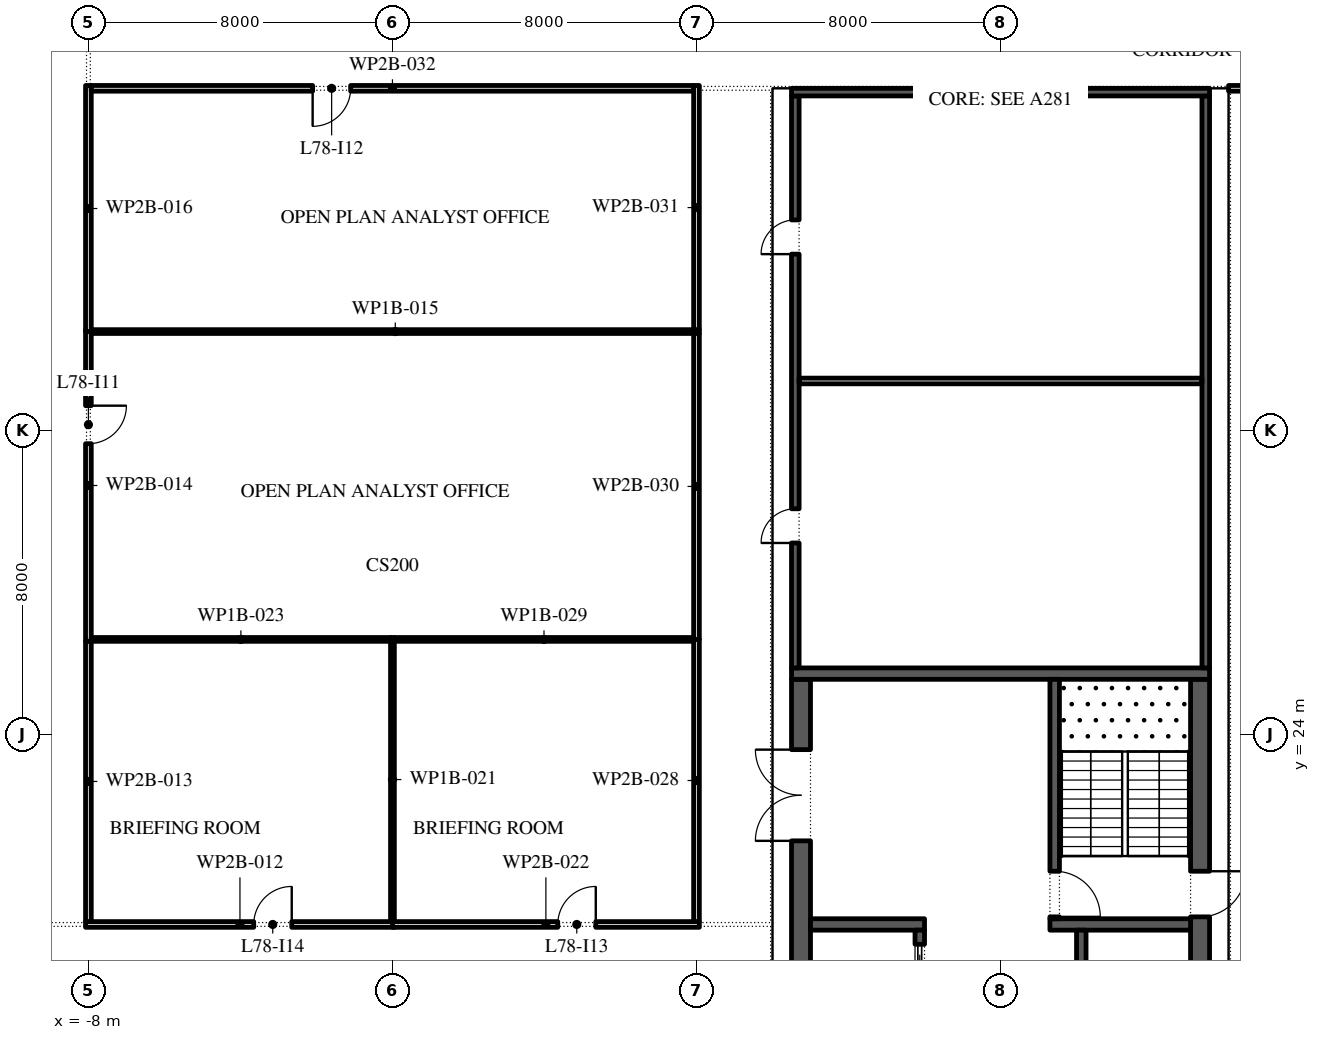
"""IFC4 building model, lengths in metres.
Left out: names, types, materials, properties, quantities, classifications, styles, units other than length and angle.
Written with IfcOpenShell. Run it as: python <this file> out.ifc"""

import sys

from ifc_helpers import new_model, si_unit, direction, frame, frame_2d, origin, place, context, subcontext, project, spatial, rectangle, extrude, element, fill, save


model = new_model("IFC4")
c1 = context("Model", 3, precision=1e-05, world=origin(), true_north=direction((0.0, 1.0)))
c2 = subcontext(c1, "Body", "Model", "MODEL_VIEW")
j1 = project(units=[si_unit("LENGTHUNIT", "METRE"), si_unit("PLANEANGLEUNIT", "RADIAN")], contexts=[c1])
p1 = place(None, origin())
s1 = spatial("IfcSite", under=j1, at=p1, CompositionType="ELEMENT")
p2 = place(p1, origin())
s2 = spatial("IfcBuilding", under=s1, at=p2, CompositionType="ELEMENT")
p3 = place(p2, frame((0.0, 0.0, 355.2)))
s3 = spatial("IfcBuildingStorey", under=s2, at=p3, CompositionType="ELEMENT", Elevation=355.2)
p4 = place(p3, frame((21.25, -2.45, 0.0), z_axis=(0.0, 0.0, 1.0), x_axis=(0.0, 1.0, 0.0)))
e1 = element("IfcWall", 1, at=p4, inside=s3, PredefinedType="SHEAR", context=c2, shape_type="SweptSolid", body=[
    extrude(rectangle(XDim=27.9, YDim=0.5, at=frame_2d((13.95, 0.0))), origin(), (0.0, 0.0, 1.0), 3.95),
])
p5 = place(p4, frame((5.05, 0.0, 0.0)))
e2 = element("IfcOpeningElement", 2, at=p5, cuts=e1, PredefinedType="OPENING", context=c2, shape_type="SweptSolid", body=[
    extrude(rectangle(XDim=1.2, YDim=2.1, at=frame_2d((0.6, 1.05))), frame((0.0, 0.26, 0.0), z_axis=(0.0, -1.0, 0.0), x_axis=(1.0, 0.0, 0.0)), (0.0, 0.0, 1.0), 0.52),
])
p6 = place(p4, frame((21.65, 0.0, 0.0)))
e3 = element("IfcOpeningElement", 3, at=p6, cuts=e1, PredefinedType="OPENING", context=c2, shape_type="SweptSolid", body=[
    extrude(rectangle(XDim=1.2, YDim=2.1, at=frame_2d((0.6, 1.05))), frame((0.0, 0.26, 0.0), z_axis=(0.0, -1.0, 0.0), x_axis=(1.0, 0.0, 0.0)), (0.0, 0.0, 1.0), 0.52),
])
p7 = place(p3, frame((10.75, -2.45, 0.0), z_axis=(0.0, 0.0, 1.0), x_axis=(0.0, 1.0, 0.0)))
e4 = element("IfcWall", 4, at=p7, inside=s3, PredefinedType="SHEAR", context=c2, shape_type="SweptSolid", body=[
    extrude(rectangle(XDim=27.9, YDim=0.5, at=frame_2d((13.95, 0.0))), origin(), (0.0, 0.0, 1.0), 3.95),
])
p8 = place(p7, frame((23.65, 0.0, 0.0)))
e5 = element("IfcOpeningElement", 5, at=p8, cuts=e4, PredefinedType="OPENING", context=c2, shape_type="SweptSolid", body=[
    extrude(rectangle(XDim=2.4, YDim=2.1, at=frame_2d((1.2, 1.05))), frame((0.0, 0.26, 0.0), z_axis=(0.0, -1.0, 0.0), x_axis=(1.0, 0.0, 0.0)), (0.0, 0.0, 1.0), 0.52),
])
p9 = place(p7, frame((1.087, 0.0, 0.0)))
e6 = element("IfcOpeningElement", 6, at=p9, cuts=e4, PredefinedType="OPENING", context=c2, shape_type="SweptSolid", body=[
    extrude(rectangle(XDim=0.9, YDim=2.1, at=frame_2d((0.45, 1.05))), frame((0.0, 0.26, 0.0), z_axis=(0.0, -1.0, 0.0), x_axis=(1.0, 0.0, 0.0)), (0.0, 0.0, 1.0), 0.52),
])
p10 = place(p7, frame((4.262, 0.0, 0.0)))
e7 = element("IfcOpeningElement", 7, at=p10, cuts=e4, PredefinedType="OPENING", context=c2, shape_type="SweptSolid", body=[
    extrude(rectangle(XDim=1.0, YDim=2.1, at=frame_2d((0.5, 1.05))), frame((0.0, 0.26, 0.0), z_axis=(0.0, -1.0, 0.0), x_axis=(1.0, 0.0, 0.0)), (0.0, 0.0, 1.0), 0.52),
])
p11 = place(p3, frame((10.5, 25.6, 0.0), z_axis=(0.0, 0.0, 1.0), x_axis=(1.0, 0.0, 0.0)))
e8 = element("IfcWall", 8, at=p11, inside=s3, PredefinedType="SHEAR", context=c2, shape_type="SweptSolid", body=[
    extrude(rectangle(XDim=11.0, YDim=0.3, at=frame_2d((5.5, 0.0))), origin(), (0.0, 0.0, 1.0), 3.95),
])
p12 = place(p3, frame((17.3, 19.0, 0.0), z_axis=(0.0, 0.0, 1.0), x_axis=(1.0, 0.0, 0.0)))
e9 = element("IfcWall", 9, at=p12, inside=s3, PredefinedType="SHEAR", context=c2, shape_type="SweptSolid", body=[
    extrude(rectangle(XDim=3.7, YDim=0.3, at=frame_2d((1.85, 0.0))), origin(), (0.0, 0.0, 1.0), 3.95),
])
p13 = place(p3, frame((17.425, 19.15, 0.0), z_axis=(0.0, 0.0, 1.0), x_axis=(0.0, 1.0, 0.0)))
e10 = element("IfcWall", 10, at=p13, inside=s3, PredefinedType="SHEAR", context=c2, shape_type="SweptSolid", body=[
    extrude(rectangle(XDim=6.3, YDim=0.25, at=frame_2d((3.15, 0.0))), origin(), (0.0, 0.0, 1.0), 3.95),
])
p14 = place(p13, frame((0.05, 0.0, 0.0)))
e11 = element("IfcOpeningElement", 11, at=p14, cuts=e10, PredefinedType="OPENING", context=c2, shape_type="SweptSolid", body=[
    extrude(rectangle(XDim=1.2, YDim=2.1, at=frame_2d((0.6, 1.05))), frame((0.0, 0.135, 0.0), z_axis=(0.0, -1.0, 0.0), x_axis=(1.0, 0.0, 0.0)), (0.0, 0.0, 1.0), 0.27),
])
p15 = place(p3, frame((18.125, 4.15, 0.0), z_axis=(0.0, 0.0, 1.0), x_axis=(0.0, 1.0, 0.0)))
e12 = element("IfcWall", 12, at=p15, inside=s3, PredefinedType="SHEAR", context=c2, shape_type="SweptSolid", body=[
    extrude(rectangle(XDim=14.7, YDim=0.25, at=frame_2d((7.35, 0.0))), origin(), (0.0, 0.0, 1.0), 3.95),
])
p16 = place(p15, frame((3.596, 0.0, 0.0)))
e13 = element("IfcOpeningElement", 13, at=p16, cuts=e12, PredefinedType="OPENING", context=c2, shape_type="SweptSolid", body=[
    extrude(rectangle(XDim=0.9, YDim=2.1, at=frame_2d((0.45, 1.05))), frame((0.0, 0.135, 0.0), z_axis=(0.0, -1.0, 0.0), x_axis=(1.0, 0.0, 0.0)), (0.0, 0.0, 1.0), 0.27),
])
p17 = place(p15, frame((9.875, 0.0, 0.0)))
e14 = element("IfcOpeningElement", 14, at=p17, cuts=e12, PredefinedType="OPENING", context=c2, shape_type="SweptSolid", body=[
    extrude(rectangle(XDim=0.9, YDim=2.1, at=frame_2d((0.45, 1.05))), frame((0.0, 0.135, 0.0), z_axis=(0.0, -1.0, 0.0), x_axis=(1.0, 0.0, 0.0)), (0.0, 0.0, 1.0), 0.27),
])
p18 = place(p15, frame((0.371, 0.0, 0.0)))
e15 = element("IfcOpeningElement", 15, at=p18, cuts=e12, PredefinedType="OPENING", context=c2, shape_type="SweptSolid", body=[
    extrude(rectangle(XDim=1.1, YDim=2.1, at=frame_2d((0.55, 1.05))), frame((0.0, 0.135, 0.0), z_axis=(0.0, -1.0, 0.0), x_axis=(1.0, 0.0, 0.0)), (0.0, 0.0, 1.0), 0.27),
])
p19 = place(p3, frame((11.0, 19.0, 0.0), z_axis=(0.0, 0.0, 1.0), x_axis=(1.0, 0.0, 0.0)))
e16 = element("IfcWall", 16, at=p19, inside=s3, PredefinedType="SHEAR", context=c2, shape_type="SweptSolid", body=[
    extrude(rectangle(XDim=3.0, YDim=0.3, at=frame_2d((1.5, 0.0))), origin(), (0.0, 0.0, 1.0), 3.95),
])
p20 = place(p3, frame((13.875, -2.45, 0.0), z_axis=(0.0, 0.0, 1.0), x_axis=(0.0, 1.0, 0.0)))
e17 = element("IfcWall", 17, at=p20, inside=s3, PredefinedType="SHEAR", context=c2, shape_type="SweptSolid", body=[
    extrude(rectangle(XDim=21.3, YDim=0.25, at=frame_2d((10.65, 0.0))), origin(), (0.0, 0.0, 1.0), 3.95),
])
p21 = place(p20, frame((11.357, 0.0, 0.0)))
e18 = element("IfcOpeningElement", 18, at=p21, cuts=e17, PredefinedType="OPENING", context=c2, shape_type="SweptSolid", body=[
    extrude(rectangle(XDim=0.9, YDim=2.1, at=frame_2d((0.45, 1.05))), frame((0.0, 0.135, 0.0), z_axis=(0.0, -1.0, 0.0), x_axis=(1.0, 0.0, 0.0)), (0.0, 0.0, 1.0), 0.27),
])
p22 = place(p20, frame((6.971, 0.0, 0.0)))
e19 = element("IfcOpeningElement", 19, at=p22, cuts=e17, PredefinedType="OPENING", context=c2, shape_type="SweptSolid", body=[
    extrude(rectangle(XDim=1.1, YDim=2.1, at=frame_2d((0.55, 1.05))), frame((0.0, 0.135, 0.0), z_axis=(0.0, -1.0, 0.0), x_axis=(1.0, 0.0, 0.0)), (0.0, 0.0, 1.0), 0.27),
])
p23 = place(p20, frame((15.543, 0.0, 0.0)))
e20 = element("IfcOpeningElement", 20, at=p23, cuts=e17, PredefinedType="OPENING", context=c2, shape_type="SweptSolid", body=[
    extrude(rectangle(XDim=1.1, YDim=2.1, at=frame_2d((0.55, 1.05))), frame((0.0, 0.135, 0.0), z_axis=(0.0, -1.0, 0.0), x_axis=(1.0, 0.0, 0.0)), (0.0, 0.0, 1.0), 0.27),
])
p24 = place(p20, frame((17.686, 0.0, 0.0)))
e21 = element("IfcOpeningElement", 21, at=p24, cuts=e17, PredefinedType="OPENING", context=c2, shape_type="SweptSolid", body=[
    extrude(rectangle(XDim=1.1, YDim=2.1, at=frame_2d((0.55, 1.05))), frame((0.0, 0.135, 0.0), z_axis=(0.0, -1.0, 0.0), x_axis=(1.0, 0.0, 0.0)), (0.0, 0.0, 1.0), 0.27),
])
p25 = place(p20, frame((19.829, 0.0, 0.0)))
e22 = element("IfcOpeningElement", 22, at=p25, cuts=e17, PredefinedType="OPENING", context=c2, shape_type="SweptSolid", body=[
    extrude(rectangle(XDim=1.1, YDim=2.1, at=frame_2d((0.55, 1.05))), frame((0.0, 0.135, 0.0), z_axis=(0.0, -1.0, 0.0), x_axis=(1.0, 0.0, 0.0)), (0.0, 0.0, 1.0), 0.27),
])
p26 = place(p3, frame((21.4, 25.75, 0.0), z_axis=(0.0, 0.0, 1.0), x_axis=(0.0, 1.0, 0.0)))
e23 = element("IfcWall", 23, at=p26, inside=s3, PredefinedType="SHEAR", context=c2, shape_type="SweptSolid", body=[
    extrude(rectangle(XDim=15.05, YDim=0.2, at=frame_2d((7.525, 0.0))), origin(), (0.0, 0.0, 1.0), 3.95),
])
p27 = place(p3, frame((10.6, 25.75, 0.0), z_axis=(0.0, 0.0, 1.0), x_axis=(0.0, 1.0, 0.0)))
e24 = element("IfcWall", 24, at=p27, inside=s3, PredefinedType="SHEAR", context=c2, shape_type="SweptSolid", body=[
    extrude(rectangle(XDim=15.05, YDim=0.2, at=frame_2d((7.525, 0.0))), origin(), (0.0, 0.0, 1.0), 3.95),
])
p28 = place(p27, frame((3.288, 0.0, 0.0)))
e25 = element("IfcOpeningElement", 25, at=p28, cuts=e24, PredefinedType="OPENING", context=c2, shape_type="SweptSolid", body=[
    extrude(rectangle(XDim=0.9, YDim=2.1, at=frame_2d((0.45, 1.05))), frame((0.0, 0.11, 0.0), z_axis=(0.0, -1.0, 0.0), x_axis=(1.0, 0.0, 0.0)), (0.0, 0.0, 1.0), 0.22),
])
p29 = place(p27, frame((10.887, 0.0, 0.0)))
e26 = element("IfcOpeningElement", 26, at=p29, cuts=e24, PredefinedType="OPENING", context=c2, shape_type="SweptSolid", body=[
    extrude(rectangle(XDim=0.9, YDim=2.1, at=frame_2d((0.45, 1.05))), frame((0.0, 0.11, 0.0), z_axis=(0.0, -1.0, 0.0), x_axis=(1.0, 0.0, 0.0)), (0.0, 0.0, 1.0), 0.22),
])
p30 = place(p3, frame((10.5, 40.9, 0.0), z_axis=(0.0, 0.0, 1.0), x_axis=(1.0, 0.0, 0.0)))
e27 = element("IfcWall", 27, at=p30, inside=s3, PredefinedType="SHEAR", context=c2, shape_type="SweptSolid", body=[
    extrude(rectangle(XDim=11.0, YDim=0.2, at=frame_2d((5.5, 0.0))), origin(), (0.0, 0.0, 1.0), 3.95),
])
p31 = place(p3, frame((10.7, 33.3, 0.0), z_axis=(0.0, 0.0, 1.0), x_axis=(1.0, 0.0, 0.0)))
e28 = element("IfcWall", 28, at=p31, inside=s3, PredefinedType="PARTITIONING", context=c2, shape_type="SweptSolid", body=[
    extrude(rectangle(XDim=10.6, YDim=0.15, at=frame_2d((5.3, 0.0))), origin(), (0.0, 0.0, 1.0), 3.95),
])
p32 = place(p3, frame((-8.075, 19.0, 0.0), z_axis=(0.0, 0.0, 1.0), x_axis=(1.0, 0.0, 0.0)))
e29 = element("IfcWall", 29, at=p32, inside=s3, PredefinedType="PARTITIONING", context=c2, shape_type="SweptSolid", body=[
    extrude(rectangle(XDim=8.125, YDim=0.15, at=frame_2d((4.062, 0.0))), origin(), (0.0, 0.0, 1.0), 3.95),
])
p33 = place(p32, frame((4.425, 0.0, 0.0)))
e30 = element("IfcOpeningElement", 30, at=p33, cuts=e29, PredefinedType="OPENING", context=c2, shape_type="SweptSolid", body=[
    extrude(rectangle(XDim=1.0, YDim=2.1, at=frame_2d((0.5, 1.05))), frame((0.0, 0.085, 0.0), z_axis=(0.0, -1.0, 0.0), x_axis=(1.0, 0.0, 0.0)), (0.0, 0.0, 1.0), 0.17),
])
p34 = place(p3, frame((-8.0, 26.45, 0.0), z_axis=(0.0, 0.0, 1.0), x_axis=(0.0, -1.0, 0.0)))
e31 = element("IfcWall", 31, at=p34, inside=s3, PredefinedType="PARTITIONING", context=c2, shape_type="SweptSolid", body=[
    extrude(rectangle(XDim=7.375, YDim=0.15, at=frame_2d((3.688, 0.0))), origin(), (0.0, 0.0, 1.0), 3.95),
])
p35 = place(p3, frame((-8.0, 34.65, 0.0), z_axis=(0.0, 0.0, 1.0), x_axis=(0.0, -1.0, 0.0)))
e32 = element("IfcWall", 32, at=p35, inside=s3, PredefinedType="PARTITIONING", context=c2, shape_type="SweptSolid", body=[
    extrude(rectangle(XDim=8.2, YDim=0.15, at=frame_2d((4.1, 0.0))), origin(), (0.0, 0.0, 1.0), 3.95),
])
p36 = place(p35, frame((2.0, 0.0, 0.0)))
e33 = element("IfcOpeningElement", 33, at=p36, cuts=e32, PredefinedType="OPENING", context=c2, shape_type="SweptSolid", body=[
    extrude(rectangle(XDim=1.0, YDim=2.1, at=frame_2d((0.5, 1.05))), frame((0.0, 0.085, 0.0), z_axis=(0.0, -1.0, 0.0), x_axis=(1.0, 0.0, 0.0)), (0.0, 0.0, 1.0), 0.17),
])
p37 = place(p3, frame((-7.925, 34.6, 0.0), z_axis=(0.0, 0.0, 1.0), x_axis=(1.0, 0.0, 0.0)))
e34 = element("IfcWall", 34, at=p37, inside=s3, PredefinedType="PARTITIONING", context=c2, shape_type="SweptSolid", body=[
    extrude(rectangle(XDim=16.0, YDim=0.1, at=frame_2d((8.0, 0.0))), origin(), (0.0, 0.0, 1.0), 3.95),
])
p38 = place(p3, frame((-8.0, 41.075, 0.0), z_axis=(0.0, 0.0, 1.0), x_axis=(0.0, -1.0, 0.0)))
e35 = element("IfcWall", 35, at=p38, inside=s3, PredefinedType="PARTITIONING", context=c2, shape_type="SweptSolid", body=[
    extrude(rectangle(XDim=6.475, YDim=0.15, at=frame_2d((3.237, 0.0))), origin(), (0.0, 0.0, 1.0), 3.95),
])
p39 = place(p3, frame((0.0, 19.075, 0.0), z_axis=(0.0, 0.0, 1.0), x_axis=(0.0, 1.0, 0.0)))
e36 = element("IfcWall", 36, at=p39, inside=s3, PredefinedType="PARTITIONING", context=c2, shape_type="SweptSolid", body=[
    extrude(rectangle(XDim=7.475, YDim=0.1, at=frame_2d((3.738, 0.0))), origin(), (0.0, 0.0, 1.0), 3.95),
])
p40 = place(p3, frame((0.0, 19.0, 0.0), z_axis=(0.0, 0.0, 1.0), x_axis=(1.0, 0.0, 0.0)))
e37 = element("IfcWall", 37, at=p40, inside=s3, PredefinedType="PARTITIONING", context=c2, shape_type="SweptSolid", body=[
    extrude(rectangle(XDim=8.075, YDim=0.15, at=frame_2d((4.038, 0.0))), origin(), (0.0, 0.0, 1.0), 3.95),
])
p41 = place(p40, frame((4.35, 0.0, 0.0)))
e38 = element("IfcOpeningElement", 38, at=p41, cuts=e37, PredefinedType="OPENING", context=c2, shape_type="SweptSolid", body=[
    extrude(rectangle(XDim=1.0, YDim=2.1, at=frame_2d((0.5, 1.05))), frame((0.0, 0.085, 0.0), z_axis=(0.0, -1.0, 0.0), x_axis=(1.0, 0.0, 0.0)), (0.0, 0.0, 1.0), 0.17),
])
p42 = place(p3, frame((-0.05, 26.5, 0.0), z_axis=(0.0, 0.0, 1.0), x_axis=(-1.0, 0.0, 0.0)))
e39 = element("IfcWall", 39, at=p42, inside=s3, PredefinedType="PARTITIONING", context=c2, shape_type="SweptSolid", body=[
    extrude(rectangle(XDim=7.875, YDim=0.1, at=frame_2d((3.938, 0.0))), origin(), (0.0, 0.0, 1.0), 3.95),
])
p43 = place(p3, frame((8.0, 19.075, 0.0), z_axis=(0.0, 0.0, 1.0), x_axis=(0.0, 1.0, 0.0)))
e40 = element("IfcWall", 40, at=p43, inside=s3, PredefinedType="PARTITIONING", context=c2, shape_type="SweptSolid", body=[
    extrude(rectangle(XDim=7.425, YDim=0.15, at=frame_2d((3.712, 0.0))), origin(), (0.0, 0.0, 1.0), 3.95),
])
p44 = place(p3, frame((7.925, 26.5, 0.0), z_axis=(0.0, 0.0, 1.0), x_axis=(-1.0, 0.0, 0.0)))
e41 = element("IfcWall", 41, at=p44, inside=s3, PredefinedType="PARTITIONING", context=c2, shape_type="SweptSolid", body=[
    extrude(rectangle(XDim=7.875, YDim=0.1, at=frame_2d((3.938, 0.0))), origin(), (0.0, 0.0, 1.0), 3.95),
])
p45 = place(p3, frame((8.0, 26.5, 0.0), z_axis=(0.0, 0.0, 1.0), x_axis=(0.0, 1.0, 0.0)))
e42 = element("IfcWall", 42, at=p45, inside=s3, PredefinedType="PARTITIONING", context=c2, shape_type="SweptSolid", body=[
    extrude(rectangle(XDim=8.05, YDim=0.15, at=frame_2d((4.025, 0.0))), origin(), (0.0, 0.0, 1.0), 3.95),
])
p46 = place(p3, frame((8.0, 34.65, 0.0), z_axis=(0.0, 0.0, 1.0), x_axis=(0.0, 1.0, 0.0)))
e43 = element("IfcWall", 43, at=p46, inside=s3, PredefinedType="PARTITIONING", context=c2, shape_type="SweptSolid", body=[
    extrude(rectangle(XDim=6.425, YDim=0.15, at=frame_2d((3.212, 0.0))), origin(), (0.0, 0.0, 1.0), 3.95),
])
p47 = place(p3, frame((7.925, 41.0, 0.0), z_axis=(0.0, 0.0, 1.0), x_axis=(-1.0, 0.0, 0.0)))
e44 = element("IfcWall", 44, at=p47, inside=s3, PredefinedType="PARTITIONING", context=c2, shape_type="SweptSolid", body=[
    extrude(rectangle(XDim=15.85, YDim=0.15, at=frame_2d((7.925, 0.0))), origin(), (0.0, 0.0, 1.0), 3.95),
])
p48 = place(p47, frame((9.025, 0.0, 0.0)))
e45 = element("IfcOpeningElement", 45, at=p48, cuts=e44, PredefinedType="OPENING", context=c2, shape_type="SweptSolid", body=[
    extrude(rectangle(XDim=1.0, YDim=2.1, at=frame_2d((0.5, 1.05))), frame((0.0, 0.085, 0.0), z_axis=(0.0, -1.0, 0.0), x_axis=(1.0, 0.0, 0.0)), (0.0, 0.0, 1.0), 0.17),
])
p49 = place(p3, frame((26.05, 41.0, 0.0), z_axis=(0.0, 0.0, 1.0), x_axis=(-1.0, 0.0, 0.0)))
e46 = element("IfcWall", 46, at=p49, inside=s3, PredefinedType="PARTITIONING", context=c2, shape_type="SweptSolid", body=[
    extrude(rectangle(XDim=4.05, YDim=0.15, at=frame_2d((2.025, 0.0))), origin(), (0.0, 0.0, 1.0), 3.95),
])
p50 = place(p49, frame((1.9, 0.0, 0.0)))
e47 = element("IfcOpeningElement", 47, at=p50, cuts=e46, PredefinedType="OPENING", context=c2, shape_type="SweptSolid", body=[
    extrude(rectangle(XDim=1.0, YDim=2.1, at=frame_2d((0.5, 1.05))), frame((0.0, 0.085, 0.0), z_axis=(0.0, -1.0, 0.0), x_axis=(1.0, 0.0, 0.0)), (0.0, 0.0, 1.0), 0.17),
])
p51 = place(p25, origin())
e48 = element("IfcDoor", 48, at=p51, inside=s3, OperationType="SLIDING_TO_LEFT", PredefinedType="DOOR", context=c2, shape_type="SweptSolid", body=[
    extrude(rectangle(XDim=1.1, YDim=2.1, at=frame_2d((0.55, 1.05))), frame((0.0, 0.025, 0.0), z_axis=(0.0, -1.0, 0.0), x_axis=(1.0, 0.0, 0.0)), (0.0, 0.0, 1.0), 0.05),
])
fill(e22, e48)
p52 = place(p8, origin())
e49 = element("IfcDoor", 49, at=p52, inside=s3, OperationType="DOUBLE_DOOR_SINGLE_SWING", PredefinedType="DOOR", context=c2, shape_type="SweptSolid", body=[
    extrude(rectangle(XDim=2.4, YDim=2.1, at=frame_2d((1.2, 1.05))), frame((0.0, 0.025, 0.0), z_axis=(0.0, -1.0, 0.0), x_axis=(1.0, 0.0, 0.0)), (0.0, 0.0, 1.0), 0.05),
])
fill(e5, e49)
p53 = place(p14, frame((1.2, 0.0, 0.0), z_axis=(0.0, 0.0, 1.0), x_axis=(-1.0, 0.0, 0.0)))
e50 = element("IfcDoor", 50, at=p53, inside=s3, OperationType="SINGLE_SWING_LEFT", PredefinedType="DOOR", context=c2, shape_type="SweptSolid", body=[
    extrude(rectangle(XDim=1.2, YDim=2.1, at=frame_2d((0.6, 1.05))), frame((0.0, 0.025, 0.0), z_axis=(0.0, -1.0, 0.0), x_axis=(1.0, 0.0, 0.0)), (0.0, 0.0, 1.0), 0.05),
])
fill(e11, e50)
p54 = place(p6, frame((1.2, 0.0, 0.0), z_axis=(0.0, 0.0, 1.0), x_axis=(-1.0, 0.0, 0.0)))
e51 = element("IfcDoor", 51, at=p54, inside=s3, OperationType="SINGLE_SWING_RIGHT", PredefinedType="DOOR", context=c2, shape_type="SweptSolid", body=[
    extrude(rectangle(XDim=1.2, YDim=2.1, at=frame_2d((0.6, 1.05))), frame((0.0, 0.025, 0.0), z_axis=(0.0, -1.0, 0.0), x_axis=(1.0, 0.0, 0.0)), (0.0, 0.0, 1.0), 0.05),
])
fill(e3, e51)
p55 = place(p28, origin())
e52 = element("IfcDoor", 52, at=p55, inside=s3, OperationType="SINGLE_SWING_RIGHT", PredefinedType="DOOR", context=c2, shape_type="SweptSolid", body=[
    extrude(rectangle(XDim=0.9, YDim=2.1, at=frame_2d((0.45, 1.05))), frame((0.0, -0.05, 0.0), z_axis=(0.0, -1.0, 0.0), x_axis=(1.0, 0.0, 0.0)), (0.0, 0.0, 1.0), 0.05),
])
fill(e25, e52)
p56 = place(p29, origin())
e53 = element("IfcDoor", 53, at=p56, inside=s3, OperationType="SINGLE_SWING_RIGHT", PredefinedType="DOOR", context=c2, shape_type="SweptSolid", body=[
    extrude(rectangle(XDim=0.9, YDim=2.1, at=frame_2d((0.45, 1.05))), frame((0.0, -0.05, 0.0), z_axis=(0.0, -1.0, 0.0), x_axis=(1.0, 0.0, 0.0)), (0.0, 0.0, 1.0), 0.05),
])
fill(e26, e53)
p57 = place(p36, origin())
e54 = element("IfcDoor", 54, at=p57, inside=s3, OperationType="SINGLE_SWING_RIGHT", PredefinedType="DOOR", context=c2, shape_type="SweptSolid", body=[
    extrude(rectangle(XDim=1.0, YDim=2.1, at=frame_2d((0.5, 1.05))), frame((0.0, 0.025, 0.0), z_axis=(0.0, -1.0, 0.0), x_axis=(1.0, 0.0, 0.0)), (0.0, 0.0, 1.0), 0.05),
])
fill(e33, e54)
p58 = place(p48, origin())
e55 = element("IfcDoor", 55, at=p58, inside=s3, OperationType="SINGLE_SWING_LEFT", PredefinedType="DOOR", context=c2, shape_type="SweptSolid", body=[
    extrude(rectangle(XDim=1.0, YDim=2.1, at=frame_2d((0.5, 1.05))), frame((0.0, 0.025, 0.0), z_axis=(0.0, -1.0, 0.0), x_axis=(1.0, 0.0, 0.0)), (0.0, 0.0, 1.0), 0.05),
])
fill(e45, e55)
p59 = place(p41, origin())
e56 = element("IfcDoor", 56, at=p59, inside=s3, OperationType="SINGLE_SWING_LEFT", PredefinedType="DOOR", context=c2, shape_type="SweptSolid", body=[
    extrude(rectangle(XDim=1.0, YDim=2.1, at=frame_2d((0.5, 1.05))), frame((0.0, 0.025, 0.0), z_axis=(0.0, -1.0, 0.0), x_axis=(1.0, 0.0, 0.0)), (0.0, 0.0, 1.0), 0.05),
])
fill(e38, e56)
p60 = place(p33, origin())
e57 = element("IfcDoor", 57, at=p60, inside=s3, OperationType="SINGLE_SWING_LEFT", PredefinedType="DOOR", context=c2, shape_type="SweptSolid", body=[
    extrude(rectangle(XDim=1.0, YDim=2.1, at=frame_2d((0.5, 1.05))), frame((0.0, 0.025, 0.0), z_axis=(0.0, -1.0, 0.0), x_axis=(1.0, 0.0, 0.0)), (0.0, 0.0, 1.0), 0.05),
])
fill(e30, e57)
save(model, sys.argv[1])
